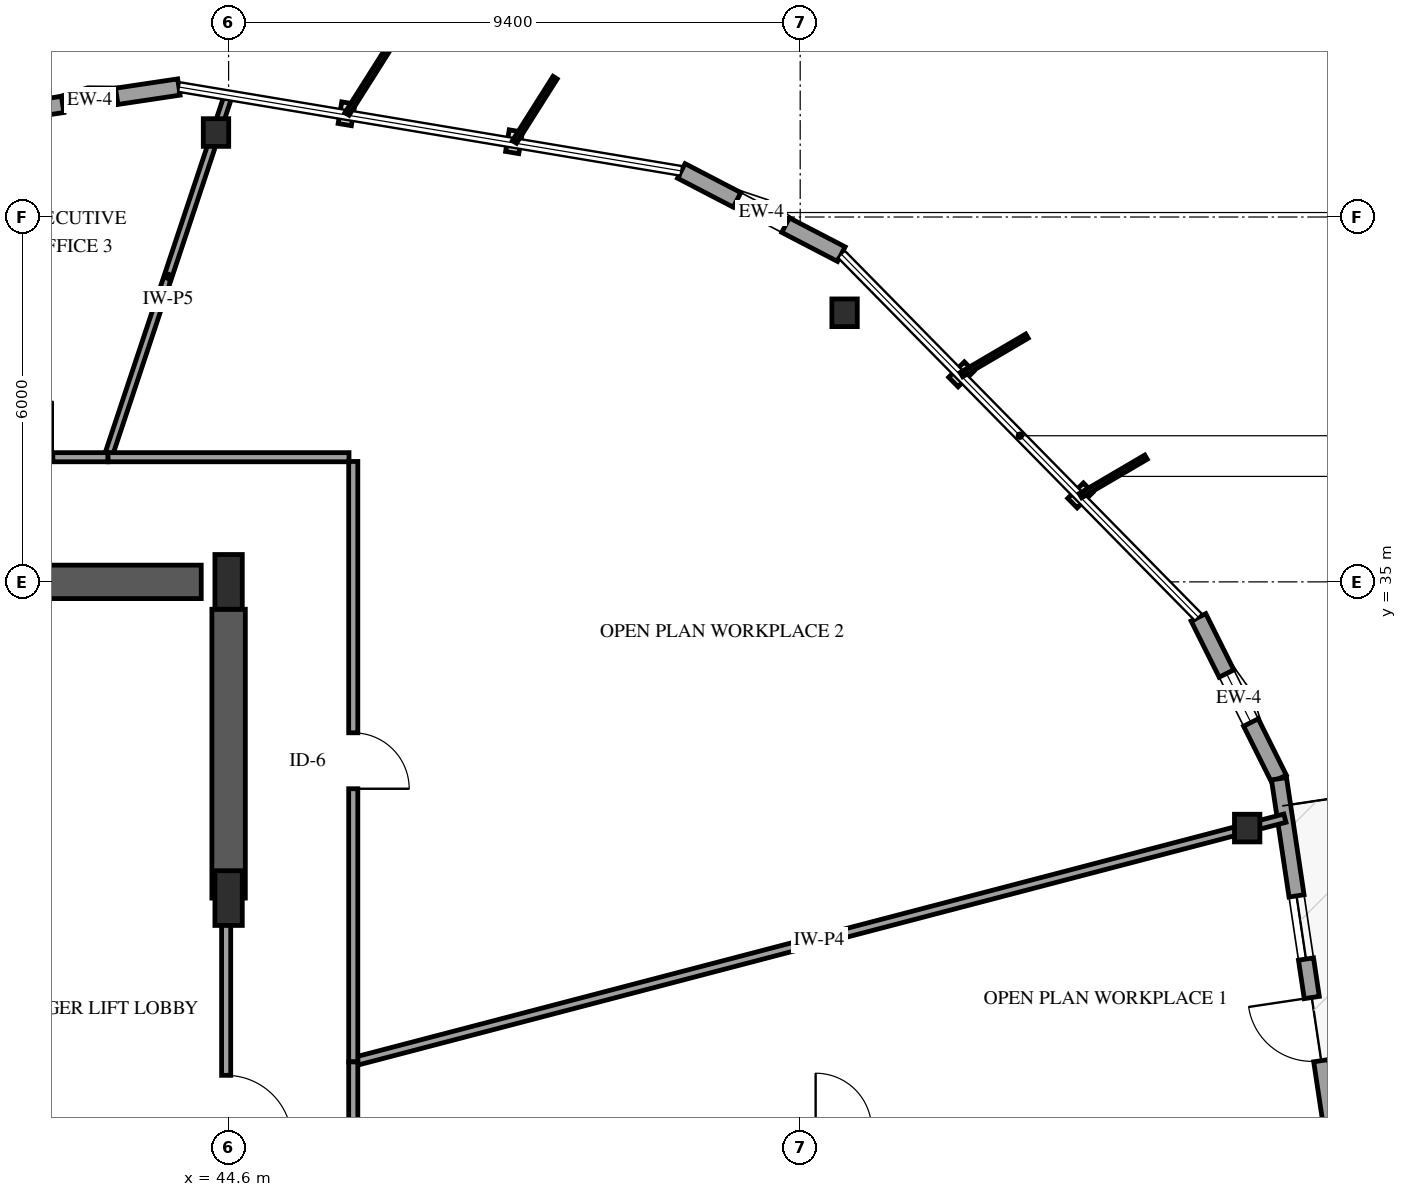
"""IFC4 building model, lengths in metres.
Left out: names, types, materials, properties, quantities, classifications, styles, units other than length and angle.
Written with IfcOpenShell. Run it as: python <this file> out.ifc"""

import sys

from ifc_helpers import new_model, si_unit, direction, frame, frame_2d, origin, origin_2d, place, context, subcontext, project, spatial, rectangle, i_section, extrude, element, fill, save


model = new_model("IFC4")
c1 = context("Model", 3, precision=1e-05, world=origin(), true_north=direction((0.0, 1.0)))
c2 = subcontext(c1, "Body", "Model", "MODEL_VIEW")
j1 = project(units=[si_unit("LENGTHUNIT", "METRE"), si_unit("PLANEANGLEUNIT", "RADIAN")], contexts=[c1])
p1 = place(None, origin())
s1 = spatial("IfcSite", under=j1, at=p1, CompositionType="ELEMENT")
p2 = place(p1, origin())
s2 = spatial("IfcBuilding", under=s1, at=p2, CompositionType="ELEMENT")
p3 = place(p2, frame((0.0, 0.0, 130.3)))
s3 = spatial("IfcBuildingStorey", under=s2, at=p3, CompositionType="ELEMENT", Elevation=130.3)
p4 = place(p3, frame((41.3, 35.0, 0.0), z_axis=(0.0, 0.0, 1.0), x_axis=(1.0, 0.0, 0.0)))
e1 = element("IfcWall", 1, at=p4, inside=s3, PredefinedType="SHEAR", context=c2, shape_type="SweptSolid", body=[
    extrude(rectangle(XDim=2.85, YDim=0.55, at=frame_2d((1.425, 0.0))), origin(), (0.0, 0.0, 1.0), 3.9),
])
p5 = place(p3, frame((44.6, 29.8, 0.0), z_axis=(0.0, 0.0, 1.0), x_axis=(0.0, 1.0, 0.0)))
e2 = element("IfcWall", 2, at=p5, inside=s3, PredefinedType="SHEAR", context=c2, shape_type="SweptSolid", body=[
    extrude(rectangle(XDim=4.75, YDim=0.55, at=frame_2d((2.375, 0.0))), origin(), (0.0, 0.0, 1.0), 3.9),
])
for number, where, z_axis, x_axis in (
    (3, (44.6, 29.8, 0.0), (0.0, 0.0, 1.0), (1.0, 0.0, 0.0)),
    (4, (44.6, 35.0, 0.0), (0.0, 0.0, 1.0), (1.0, 0.0, 0.0)),
):
    element("IfcColumn", number, at=place(p3, frame(where, z_axis=z_axis, x_axis=x_axis)), inside=s3, PredefinedType="PILASTER", context=c2, shape_type="SweptSolid", body=[
        extrude(rectangle(XDim=0.45, YDim=0.9, at=origin_2d()), origin(), (0.0, 0.0, 1.0), 3.9),
    ])
for number, where, z_axis, x_axis in (
    (5, (61.351, 30.951, 0.0), (0.0, 0.0, 1.0), (1.0, 0.0, 0.0)),
    (6, (54.73, 39.425, 0.0), (0.0, 0.0, 1.0), (1.0, 0.0, 0.0)),
    (7, (44.393, 42.389, 0.0), (0.0, 0.0, 1.0), (1.0, 0.0, 0.0)),
):
    element("IfcColumn", number, at=place(p3, frame(where, z_axis=z_axis, x_axis=x_axis)), inside=s3, PredefinedType="COLUMN", context=c2, shape_type="SweptSolid", body=[
        extrude(i_section(OverallWidth=0.418, OverallDepth=0.455, WebThickness=0.042, FlangeThickness=0.068, FilletRadius=0.038, at=origin_2d()), origin(), (0.0, 0.0, 1.0), 3.9),
    ])
p6 = place(p3, frame((54.676, 40.389, 0.0), z_axis=(0.0, 0.0, 1.0), x_axis=(-0.887169636056, 0.461443427585, 0.0)))
e8 = element("IfcWall", 8, at=p6, inside=s3, PredefinedType="SOLIDWALL", context=c2, shape_type="SweptSolid", body=[
    extrude(rectangle(XDim=2.967, YDim=0.27, at=frame_2d((1.483, 0.0))), origin(), (0.0, 0.0, 1.0), 2.939),
])
p7 = place(p6, frame((1.033, 0.0, 0.75)))
e9 = element("IfcOpeningElement", 9, at=p7, cuts=e8, PredefinedType="OPENING", context=c2, shape_type="SweptSolid", body=[
    extrude(rectangle(XDim=0.9, YDim=1.5, at=frame_2d((0.45, 0.75))), frame((0.0, 0.145, 0.0), z_axis=(0.0, -1.0, 0.0), x_axis=(1.0, 0.0, 0.0)), (0.0, 0.0, 1.0), 0.29),
])
p8 = place(p3, frame((43.783, 43.138, 0.0), z_axis=(0.0, 0.0, 1.0), x_axis=(-0.988967117617, -0.148135209429, 0.0)))
e10 = element("IfcWall", 10, at=p8, inside=s3, PredefinedType="SOLIDWALL", context=c2, shape_type="SweptSolid", body=[
    extrude(rectangle(XDim=2.967, YDim=0.27, at=frame_2d((1.483, 0.0))), origin(), (0.0, 0.0, 1.0), 2.939),
])
p9 = place(p8, frame((1.033, 0.0, 0.75)))
e11 = element("IfcOpeningElement", 11, at=p9, cuts=e10, PredefinedType="OPENING", context=c2, shape_type="SweptSolid", body=[
    extrude(rectangle(XDim=0.9, YDim=1.5, at=frame_2d((0.45, 0.75))), frame((0.0, 0.145, 0.0), z_axis=(0.0, -1.0, 0.0), x_axis=(1.0, 0.0, 0.0)), (0.0, 0.0, 1.0), 0.29),
])
p10 = place(p3, frame((61.874, 31.763, 0.0), z_axis=(0.0, 0.0, 1.0), x_axis=(-0.446489189921, 0.894789027248, 0.0)))
e12 = element("IfcWall", 12, at=p10, inside=s3, PredefinedType="SOLIDWALL", context=c2, shape_type="SweptSolid", body=[
    extrude(rectangle(XDim=2.966, YDim=0.27, at=frame_2d((1.483, 0.0))), origin(), (0.0, 0.0, 1.0), 2.939),
])
p11 = place(p10, frame((1.033, 0.0, 0.75)))
e13 = element("IfcOpeningElement", 13, at=p11, cuts=e12, PredefinedType="OPENING", context=c2, shape_type="SweptSolid", body=[
    extrude(rectangle(XDim=0.9, YDim=1.5, at=frame_2d((0.45, 0.75))), frame((0.0, 0.145, 0.0), z_axis=(0.0, -1.0, 0.0), x_axis=(1.0, 0.0, 0.0)), (0.0, 0.0, 1.0), 0.29),
])
p12 = place(p3, frame((63.115, 23.479, 0.0), z_axis=(0.0, 0.0, 1.0), x_axis=(-0.148183669797, 0.988959857631, 0.0)))
e14 = element("IfcWall", 14, at=p12, inside=s3, PredefinedType="SOLIDWALL", context=c2, shape_type="SweptSolid", body=[
    extrude(rectangle(XDim=8.376, YDim=0.25, at=frame_2d((4.188, 0.0))), origin(), (0.0, 0.0, 1.0), 2.939),
])
p13 = place(p12, frame((3.688, 0.0, 0.0)))
e15 = element("IfcOpeningElement", 15, at=p13, cuts=e14, PredefinedType="OPENING", context=c2, shape_type="SweptSolid", body=[
    extrude(rectangle(XDim=1.05, YDim=2.15, at=frame_2d((0.525, 1.075))), frame((0.0, 0.135, 0.0), z_axis=(0.0, -1.0, 0.0), x_axis=(1.0, 0.0, 0.0)), (0.0, 0.0, 1.0), 0.27),
])
p14 = place(p12, frame((0.959, 0.0, 0.72)))
e16 = element("IfcOpeningElement", 16, at=p14, cuts=e14, PredefinedType="OPENING", context=c2, shape_type="SweptSolid", body=[
    extrude(rectangle(XDim=1.05, YDim=1.55, at=frame_2d((0.525, 0.775))), frame((0.0, 0.135, 0.0), z_axis=(0.0, -1.0, 0.0), x_axis=(1.0, 0.0, 0.0)), (0.0, 0.0, 1.0), 0.27),
])
p15 = place(p12, frame((5.378, 0.0, 0.72)))
e17 = element("IfcOpeningElement", 17, at=p15, cuts=e14, PredefinedType="OPENING", context=c2, shape_type="SweptSolid", body=[
    extrude(rectangle(XDim=1.05, YDim=1.55, at=frame_2d((0.525, 0.775))), frame((0.0, 0.135, 0.0), z_axis=(0.0, -1.0, 0.0), x_axis=(1.0, 0.0, 0.0)), (0.0, 0.0, 1.0), 0.27),
])
p16 = place(p3, frame((46.65, 27.106, 0.0), z_axis=(0.0, 0.0, 1.0), x_axis=(0.967443345074, 0.2530876806, 0.0)))
e18 = element("IfcWall", 18, at=p16, inside=s3, PredefinedType="PARTITIONING", context=c2, shape_type="SweptSolid", body=[
    extrude(rectangle(XDim=15.837, YDim=0.14, at=frame_2d((7.918, 0.0))), origin(), (0.0, 0.0, 1.0), 2.855),
])
p17 = place(p3, frame((46.65, 36.98, 0.0), z_axis=(0.0, 0.0, 1.0), x_axis=(0.0, -1.0, 0.0)))
e19 = element("IfcWall", 19, at=p17, inside=s3, PredefinedType="PARTITIONING", context=c2, shape_type="SweptSolid", body=[
    extrude(rectangle(XDim=9.874, YDim=0.15, at=frame_2d((4.937, 0.0))), origin(), (0.0, 0.0, 1.0), 3.56),
])
p18 = place(p17, frame((4.462, 0.0, 0.0)))
e20 = element("IfcOpeningElement", 20, at=p18, cuts=e19, PredefinedType="OPENING", context=c2, shape_type="SweptSolid", body=[
    extrude(rectangle(XDim=0.92, YDim=2.12, at=frame_2d((0.46, 1.06))), frame((0.0, 0.085, 0.0), z_axis=(0.0, -1.0, 0.0), x_axis=(1.0, 0.0, 0.0)), (0.0, 0.0, 1.0), 0.17),
])
p19 = place(p3, frame((44.56, 29.8, 0.0), z_axis=(0.0, 0.0, 1.0), x_axis=(0.0, -1.0, 0.0)))
e21 = element("IfcWall", 21, at=p19, inside=s3, PredefinedType="PARTITIONING", context=c2, shape_type="SweptSolid", body=[
    extrude(rectangle(XDim=6.91, YDim=0.15, at=frame_2d((3.455, 0.0))), origin(), (0.0, 0.0, 1.0), 2.6),
])
p20 = place(p19, frame((2.915, 0.0, 0.0)))
e22 = element("IfcOpeningElement", 22, at=p20, cuts=e21, PredefinedType="OPENING", context=c2, shape_type="SweptSolid", body=[
    extrude(rectangle(XDim=1.08, YDim=2.15, at=frame_2d((0.54, 1.075))), frame((0.0, 0.085, 0.0), z_axis=(0.0, -1.0, 0.0), x_axis=(1.0, 0.0, 0.0)), (0.0, 0.0, 1.0), 0.17),
])
p21 = place(p3, frame((42.614, 37.05, 0.0), z_axis=(0.0, 0.0, 1.0), x_axis=(0.315935866472, 0.948780548007, 0.0)))
e23 = element("IfcWall", 23, at=p21, inside=s3, PredefinedType="PARTITIONING", context=c2, shape_type="SweptSolid", body=[
    extrude(rectangle(XDim=6.273, YDim=0.13, at=frame_2d((3.137, 0.0))), origin(), (0.0, 0.0, 1.0), 2.855),
])
p22 = place(p3, frame((42.614, 37.05, 0.0), z_axis=(0.0, 0.0, 1.0), x_axis=(1.0, 0.0, 0.0)))
e24 = element("IfcWall", 24, at=p22, inside=s3, PredefinedType="PARTITIONING", context=c2, shape_type="SweptSolid", body=[
    extrude(rectangle(XDim=3.966, YDim=0.15, at=frame_2d((1.983, 0.0))), origin(), (0.0, 0.0, 1.0), 3.56),
])
p23 = place(p3, frame((39.915, 37.05, 0.0), z_axis=(0.0, 0.0, 1.0), x_axis=(1.0, 0.0, 0.0)))
e25 = element("IfcWall", 25, at=p23, inside=s3, PredefinedType="PARTITIONING", context=c2, shape_type="SweptSolid", body=[
    extrude(rectangle(XDim=2.699, YDim=0.15, at=frame_2d((1.35, 0.0))), origin(), (0.0, 0.0, 1.0), 3.56),
])
p24 = place(p23, frame((0.874, 0.0, 0.0)))
e26 = element("IfcOpeningElement", 26, at=p24, cuts=e25, PredefinedType="OPENING", context=c2, shape_type="SweptSolid", body=[
    extrude(rectangle(XDim=0.92, YDim=2.12, at=frame_2d((0.46, 1.06))), frame((0.0, 0.085, 0.0), z_axis=(0.0, -1.0, 0.0), x_axis=(1.0, 0.0, 0.0)), (0.0, 0.0, 1.0), 0.17),
])
p25 = place(p3, frame((46.65, 27.106, 0.0), z_axis=(0.0, 0.0, 1.0), x_axis=(0.0, -1.0, 0.0)))
e27 = element("IfcWall", 27, at=p25, inside=s3, PredefinedType="PARTITIONING", context=c2, shape_type="SweptSolid", body=[
    extrude(rectangle(XDim=1.036, YDim=0.15, at=frame_2d((0.518, 0.0))), origin(), (0.0, 0.0, 1.0), 3.56),
])
p26 = place(p7, origin())
e28 = element("IfcWindow", 28, at=p26, inside=s3, PartitioningType="SINGLE_PANEL", PredefinedType="WINDOW", context=c2, shape_type="SweptSolid", body=[
    extrude(rectangle(XDim=0.9, YDim=1.5, at=frame_2d((0.45, 0.75))), frame((0.0, 0.03, 0.0), z_axis=(0.0, -1.0, 0.0), x_axis=(1.0, 0.0, 0.0)), (0.0, 0.0, 1.0), 0.06),
])
fill(e9, e28)
p27 = place(p9, origin())
e29 = element("IfcWindow", 29, at=p27, inside=s3, PartitioningType="SINGLE_PANEL", PredefinedType="WINDOW", context=c2, shape_type="SweptSolid", body=[
    extrude(rectangle(XDim=0.9, YDim=1.5, at=frame_2d((0.45, 0.75))), frame((0.0, 0.03, 0.0), z_axis=(0.0, -1.0, 0.0), x_axis=(1.0, 0.0, 0.0)), (0.0, 0.0, 1.0), 0.06),
])
fill(e11, e29)
p28 = place(p11, origin())
e30 = element("IfcWindow", 30, at=p28, inside=s3, PartitioningType="SINGLE_PANEL", PredefinedType="WINDOW", context=c2, shape_type="SweptSolid", body=[
    extrude(rectangle(XDim=0.9, YDim=1.5, at=frame_2d((0.45, 0.75))), frame((0.0, 0.03, 0.0), z_axis=(0.0, -1.0, 0.0), x_axis=(1.0, 0.0, 0.0)), (0.0, 0.0, 1.0), 0.06),
])
fill(e13, e30)
p29 = place(p13, origin())
e31 = element("IfcDoor", 31, at=p29, inside=s3, OperationType="SINGLE_SWING_RIGHT", PredefinedType="DOOR", context=c2, shape_type="SweptSolid", body=[
    extrude(rectangle(XDim=1.05, YDim=2.15, at=frame_2d((0.525, 1.075))), frame((0.0, 0.025, 0.0), z_axis=(0.0, -1.0, 0.0), x_axis=(1.0, 0.0, 0.0)), (0.0, 0.0, 1.0), 0.05),
])
fill(e15, e31)
p30 = place(p15, origin())
e32 = element("IfcWindow", 32, at=p30, inside=s3, PartitioningType="SINGLE_PANEL", PredefinedType="WINDOW", context=c2, shape_type="SweptSolid", body=[
    extrude(rectangle(XDim=1.05, YDim=1.55, at=frame_2d((0.525, 0.775))), frame((0.0, 0.03, 0.0), z_axis=(0.0, -1.0, 0.0), x_axis=(1.0, 0.0, 0.0)), (0.0, 0.0, 1.0), 0.06),
])
fill(e17, e32)
p31 = place(p18, origin())
e33 = element("IfcDoor", 33, at=p31, inside=s3, OperationType="SINGLE_SWING_RIGHT", PredefinedType="DOOR", context=c2, shape_type="SweptSolid", body=[
    extrude(rectangle(XDim=0.92, YDim=2.12, at=frame_2d((0.46, 1.06))), frame((0.0, 0.025, 0.0), z_axis=(0.0, -1.0, 0.0), x_axis=(1.0, 0.0, 0.0)), (0.0, 0.0, 1.0), 0.05),
])
fill(e20, e33)
p32 = place(p20, origin())
e34 = element("IfcDoor", 34, at=p32, inside=s3, OperationType="SINGLE_SWING_RIGHT", PredefinedType="DOOR", context=c2, shape_type="SweptSolid", body=[
    extrude(rectangle(XDim=1.08, YDim=2.15, at=frame_2d((0.54, 1.075))), frame((0.0, 0.025, 0.0), z_axis=(0.0, -1.0, 0.0), x_axis=(1.0, 0.0, 0.0)), (0.0, 0.0, 1.0), 0.05),
])
fill(e22, e34)
save(model, sys.argv[1])
